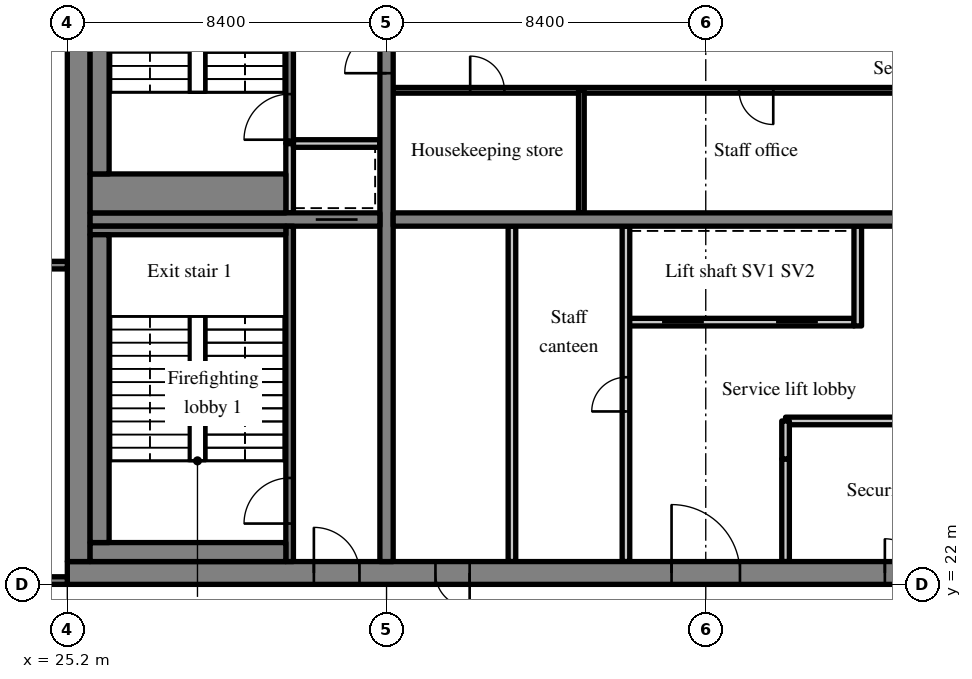
"""IFC4 building model, lengths in metres.
Left out: names, types, materials, properties, quantities, classifications, styles, units other than length and angle.
Written with IfcOpenShell. Run it as: python <this file> out.ifc"""

import sys

from ifc_helpers import new_model, si_unit, direction, frame, frame_2d, origin, place, context, subcontext, project, spatial, rectangle, extrude, source, transform, mapped, element, fill, save


model = new_model("IFC4")
c1 = context("Model", 3, precision=1e-05, world=origin(), true_north=direction((0.0, 1.0)))
c2 = subcontext(c1, "Body", "Model", "MODEL_VIEW")
j1 = project(units=[si_unit("LENGTHUNIT", "METRE"), si_unit("PLANEANGLEUNIT", "RADIAN")], contexts=[c1])
p1 = place(None, origin())
s1 = spatial("IfcSite", under=j1, at=p1, CompositionType="ELEMENT")
p2 = place(p1, origin())
s2 = spatial("IfcBuilding", under=s1, at=p2, CompositionType="ELEMENT")
p3 = place(p2, frame((0.0, 0.0, 221.8)))
s3 = spatial("IfcBuildingStorey", under=s2, at=p3, CompositionType="ELEMENT", Elevation=221.8)
m1 = source(origin(), c2, "Body", "SweptSolid", [
    extrude(rectangle(XDim=50.4, YDim=0.6, at=frame_2d((25.2, 0.0))), origin(), (0.0, 0.0, 1.0), 3.62),
])
p4 = place(p3, frame((25.2, 22.3, 0.0), z_axis=(0.0, 0.0, 1.0), x_axis=(1.0, 0.0, 0.0)))
e1 = element("IfcWall", 1, at=p4, inside=s3, PredefinedType="SHEAR", context=c2, shape_type="MappedRepresentation", body=[
    mapped(m1, transform((0.0, 0.0, 0.0), scale=1.0)),
])
m2 = source(origin(), c2, "Body", "SweptSolid", [
    extrude(rectangle(XDim=1.8, YDim=2.1, at=frame_2d((0.9, 1.05))), frame((0.0, 0.31, 0.0), z_axis=(0.0, -1.0, 0.0), x_axis=(1.0, 0.0, 0.0)), (0.0, 0.0, 1.0), 0.62),
])
p5 = place(p4, frame((15.9, 0.0, 0.0)))
e2 = element("IfcOpeningElement", 2, at=p5, cuts=e1, PredefinedType="OPENING", context=c2, shape_type="MappedRepresentation", body=[
    mapped(m2, transform((0.0, 0.0, 0.0), scale=1.0)),
])
m3 = source(origin(), c2, "Body", "SweptSolid", [
    extrude(rectangle(XDim=0.9, YDim=2.1, at=frame_2d((0.45, 1.05))), frame((0.0, 0.31, 0.0), z_axis=(0.0, -1.0, 0.0), x_axis=(1.0, 0.0, 0.0)), (0.0, 0.0, 1.0), 0.62),
])
p6 = place(p4, frame((9.687, 0.0, 0.0)))
e3 = element("IfcOpeningElement", 3, at=p6, cuts=e1, PredefinedType="OPENING", context=c2, shape_type="MappedRepresentation", body=[
    mapped(m3, transform((0.0, 0.0, 0.0), scale=1.0)),
])
p7 = place(p4, frame((21.513, 0.0, 0.0)))
e4 = element("IfcOpeningElement", 4, at=p7, cuts=e1, PredefinedType="OPENING", context=c2, shape_type="MappedRepresentation", body=[
    mapped(m3, transform((0.0, 0.0, 0.0), scale=1.0)),
])
p8 = place(p4, frame((32.7, 0.0, 0.0)))
e5 = element("IfcOpeningElement", 5, at=p8, cuts=e1, PredefinedType="OPENING", context=c2, shape_type="MappedRepresentation", body=[
    mapped(m2, transform((0.0, 0.0, 0.0), scale=1.0)),
])
m4 = source(origin(), c2, "Body", "SweptSolid", [
    extrude(rectangle(XDim=1.2, YDim=2.1, at=frame_2d((0.6, 1.05))), frame((0.0, 0.31, 0.0), z_axis=(0.0, -1.0, 0.0), x_axis=(1.0, 0.0, 0.0)), (0.0, 0.0, 1.0), 0.62),
])
p9 = place(p4, frame((6.488, 0.0, 0.0)))
e6 = element("IfcOpeningElement", 6, at=p9, cuts=e1, PredefinedType="OPENING", context=c2, shape_type="MappedRepresentation", body=[
    mapped(m4, transform((0.0, 0.0, 0.0), scale=1.0)),
])
p10 = place(p4, frame((47.925, 0.0, 0.0)))
e7 = element("IfcOpeningElement", 7, at=p10, cuts=e1, PredefinedType="OPENING", context=c2, shape_type="MappedRepresentation", body=[
    mapped(m4, transform((0.0, 0.0, 0.0), scale=1.0)),
])
m5 = source(origin(), c2, "Body", "SweptSolid", [
    extrude(rectangle(XDim=18.8, YDim=0.6, at=frame_2d((9.4, 0.0))), origin(), (0.0, 0.0, 1.0), 3.62),
])
p11 = place(p3, frame((25.5, 22.6, 0.0), z_axis=(0.0, 0.0, 1.0), x_axis=(0.0, 1.0, 0.0)))
e8 = element("IfcWall", 8, at=p11, inside=s3, PredefinedType="SHEAR", context=c2, shape_type="MappedRepresentation", body=[
    mapped(m5, transform((0.0, 0.0, 0.0), scale=1.0)),
])
m6 = source(origin(), c2, "Body", "SweptSolid", [
    extrude(rectangle(XDim=18.8, YDim=0.35, at=frame_2d((9.4, 0.0))), origin(), (0.0, 0.0, 1.0), 3.62),
])
p12 = place(p3, frame((33.6, 22.6, 0.0), z_axis=(0.0, 0.0, 1.0), x_axis=(0.0, 1.0, 0.0)))
e9 = element("IfcWall", 9, at=p12, inside=s3, PredefinedType="SHEAR", context=c2, shape_type="MappedRepresentation", body=[
    mapped(m6, transform((0.0, 0.0, 0.0), scale=1.0)),
])
m7 = source(origin(), c2, "Body", "SweptSolid", [
    extrude(rectangle(XDim=1.1, YDim=2.1, at=frame_2d((0.55, 1.05))), frame((0.0, 0.185, 0.0), z_axis=(0.0, -1.0, 0.0), x_axis=(1.0, 0.0, 0.0)), (0.0, 0.0, 1.0), 0.37),
])
p13 = place(p12, frame((12.85, 0.0, 0.0)))
e10 = element("IfcOpeningElement", 10, at=p13, cuts=e9, PredefinedType="OPENING", context=c2, shape_type="MappedRepresentation", body=[
    mapped(m7, transform((0.0, 0.0, 0.0), scale=1.0)),
])
m8 = source(origin(), c2, "Body", "SweptSolid", [
    extrude(rectangle(XDim=7.625, YDim=0.35, at=frame_2d((3.812, 0.0))), origin(), (0.0, 0.0, 1.0), 3.62),
])
p14 = place(p3, frame((25.8, 31.6, 0.0), z_axis=(0.0, 0.0, 1.0), x_axis=(1.0, 0.0, 0.0)))
e11 = element("IfcWall", 11, at=p14, inside=s3, PredefinedType="SHEAR", context=c2, shape_type="MappedRepresentation", body=[
    mapped(m8, transform((0.0, 0.0, 0.0), scale=1.0)),
])
p15 = place(p14, frame((5.938, 0.0, 0.0)))
e12 = element("IfcOpeningElement", 12, at=p15, cuts=e11, PredefinedType="OPENING", context=c2, shape_type="MappedRepresentation", body=[
    mapped(m7, transform((0.0, 0.0, 0.0), scale=1.0)),
])
m9 = source(origin(), c2, "Body", "SweptSolid", [
    extrude(rectangle(XDim=16.45, YDim=0.35, at=frame_2d((8.225, 0.0))), origin(), (0.0, 0.0, 1.0), 3.62),
])
p16 = place(p3, frame((33.775, 31.6, 0.0), z_axis=(0.0, 0.0, 1.0), x_axis=(1.0, 0.0, 0.0)))
e13 = element("IfcWall", 13, at=p16, inside=s3, PredefinedType="SHEAR", context=c2, shape_type="MappedRepresentation", body=[
    mapped(m9, transform((0.0, 0.0, 0.0), scale=1.0)),
])
m10 = source(origin(), c2, "Body", "SweptSolid", [
    extrude(rectangle(XDim=1.0, YDim=2.1, at=frame_2d((0.5, 1.05))), frame((0.0, 0.185, 0.0), z_axis=(0.0, -1.0, 0.0), x_axis=(1.0, 0.0, 0.0)), (0.0, 0.0, 1.0), 0.37),
])
p17 = place(p16, frame((14.837, 0.0, 0.0)))
e14 = element("IfcOpeningElement", 14, at=p17, cuts=e13, PredefinedType="OPENING", context=c2, shape_type="MappedRepresentation", body=[
    mapped(m10, transform((0.0, 0.0, 0.0), scale=1.0)),
])
m11 = source(origin(), c2, "Body", "SweptSolid", [
    extrude(rectangle(XDim=6.0, YDim=0.2, at=frame_2d((3.0, 0.0))), origin(), (0.0, 0.0, 1.0), 3.62),
])
p18 = place(p3, frame((39.9, 28.9, 0.0), z_axis=(0.0, 0.0, 1.0), x_axis=(1.0, 0.0, 0.0)))
e15 = element("IfcWall", 15, at=p18, inside=s3, PredefinedType="SOLIDWALL", context=c2, shape_type="MappedRepresentation", body=[
    mapped(m11, transform((0.0, 0.0, 0.0), scale=1.0)),
])
m12 = source(origin(), c2, "Body", "SweptSolid", [
    extrude(rectangle(XDim=1.1, YDim=2.1, at=frame_2d((0.55, 1.05))), frame((0.0, 0.11, 0.0), z_axis=(0.0, -1.0, 0.0), x_axis=(1.0, 0.0, 0.0)), (0.0, 0.0, 1.0), 0.22),
])
p19 = place(p18, frame((0.95, 0.0, 0.0)))
e16 = element("IfcOpeningElement", 16, at=p19, cuts=e15, PredefinedType="OPENING", context=c2, shape_type="MappedRepresentation", body=[
    mapped(m12, transform((0.0, 0.0, 0.0), scale=1.0)),
])
p20 = place(p18, frame((3.95, 0.0, 0.0)))
e17 = element("IfcOpeningElement", 17, at=p20, cuts=e15, PredefinedType="OPENING", context=c2, shape_type="MappedRepresentation", body=[
    mapped(m12, transform((0.0, 0.0, 0.0), scale=1.0)),
])
m13 = source(origin(), c2, "Body", "SweptSolid", [
    extrude(rectangle(XDim=8.825, YDim=0.2, at=frame_2d((4.413, 0.0))), origin(), (0.0, 0.0, 1.0), 3.62),
])
p21 = place(p3, frame((39.9, 22.6, 0.0), z_axis=(0.0, 0.0, 1.0), x_axis=(0.0, 1.0, 0.0)))
e18 = element("IfcWall", 18, at=p21, inside=s3, PredefinedType="PARTITIONING", context=c2, shape_type="MappedRepresentation", body=[
    mapped(m13, transform((0.0, 0.0, 0.0), scale=1.0)),
])
m14 = source(origin(), c2, "Body", "SweptSolid", [
    extrude(rectangle(XDim=0.9, YDim=2.1, at=frame_2d((0.45, 1.05))), frame((0.0, 0.11, 0.0), z_axis=(0.0, -1.0, 0.0), x_axis=(1.0, 0.0, 0.0)), (0.0, 0.0, 1.0), 0.22),
])
p22 = place(p21, frame((3.95, 0.0, 0.0)))
e19 = element("IfcOpeningElement", 19, at=p22, cuts=e18, PredefinedType="OPENING", context=c2, shape_type="MappedRepresentation", body=[
    mapped(m14, transform((0.0, 0.0, 0.0), scale=1.0)),
])
m15 = source(origin(), c2, "Body", "SweptSolid", [
    extrude(rectangle(XDim=2.7, YDim=0.2, at=frame_2d((1.35, 0.0))), origin(), (0.0, 0.0, 1.0), 3.62),
])
p23 = place(p3, frame((44.1, 22.6, 0.0), z_axis=(0.0, 0.0, 1.0), x_axis=(0.0, 1.0, 0.0)))
e20 = element("IfcWall", 20, at=p23, inside=s3, PredefinedType="PARTITIONING", context=c2, shape_type="MappedRepresentation", body=[
    mapped(m15, transform((0.0, 0.0, 0.0), scale=1.0)),
])
m16 = source(origin(), c2, "Body", "SweptSolid", [
    extrude(rectangle(XDim=2.625, YDim=0.2, at=frame_2d((1.312, 0.0))), origin(), (0.0, 0.0, 1.0), 3.62),
])
p24 = place(p3, frame((46.0, 28.8, 0.0), z_axis=(0.0, 0.0, 1.0), x_axis=(0.0, 1.0, 0.0)))
e21 = element("IfcWall", 21, at=p24, inside=s3, PredefinedType="SOLIDWALL", context=c2, shape_type="MappedRepresentation", body=[
    mapped(m16, transform((0.0, 0.0, 0.0), scale=1.0)),
])
p25 = place(p3, frame((36.9, 22.6, 0.0), z_axis=(0.0, 0.0, 1.0), x_axis=(0.0, 1.0, 0.0)))
e22 = element("IfcWall", 22, at=p25, inside=s3, PredefinedType="PARTITIONING", context=c2, shape_type="MappedRepresentation", body=[
    mapped(m13, transform((0.0, 0.0, 0.0), scale=1.0)),
])
m17 = source(origin(), c2, "Body", "SweptSolid", [
    extrude(rectangle(XDim=6.125, YDim=0.2, at=frame_2d((3.062, 0.0))), origin(), (0.0, 0.0, 1.0), 3.62),
])
p26 = place(p3, frame((44.1, 26.3, 0.0), z_axis=(0.0, 0.0, 1.0), x_axis=(1.0, 0.0, 0.0)))
e23 = element("IfcWall", 23, at=p26, inside=s3, PredefinedType="PARTITIONING", context=c2, shape_type="MappedRepresentation", body=[
    mapped(m17, transform((0.0, 0.0, 0.0), scale=1.0)),
])
m18 = source(origin(), c2, "Body", "SweptSolid", [
    extrude(rectangle(XDim=1.0, YDim=0.2, at=frame_2d((0.5, 0.0))), origin(), (0.0, 0.0, 1.0), 3.62),
])
p27 = place(p3, frame((44.1, 25.3, 0.0), z_axis=(0.0, 0.0, 1.0), x_axis=(0.0, 1.0, 0.0)))
e24 = element("IfcWall", 24, at=p27, inside=s3, PredefinedType="PARTITIONING", context=c2, shape_type="MappedRepresentation", body=[
    mapped(m18, transform((0.0, 0.0, 0.0), scale=1.0)),
])
m19 = source(origin(), c2, "Body", "SweptSolid", [
    extrude(rectangle(XDim=14.225, YDim=0.15, at=frame_2d((7.113, 0.0))), origin(), (0.0, 0.0, 1.0), 3.62),
])
p28 = place(p3, frame((33.775, 35.0, 0.0), z_axis=(0.0, 0.0, 1.0), x_axis=(1.0, 0.0, 0.0)))
e25 = element("IfcWall", 25, at=p28, inside=s3, PredefinedType="PARTITIONING", context=c2, shape_type="MappedRepresentation", body=[
    mapped(m19, transform((0.0, 0.0, 0.0), scale=1.0)),
])
m20 = source(origin(), c2, "Body", "SweptSolid", [
    extrude(rectangle(XDim=0.9, YDim=2.1, at=frame_2d((0.45, 1.05))), frame((0.0, 0.085, 0.0), z_axis=(0.0, -1.0, 0.0), x_axis=(1.0, 0.0, 0.0)), (0.0, 0.0, 1.0), 0.17),
])
p29 = place(p28, frame((2.026, 0.0, 0.0)))
e26 = element("IfcOpeningElement", 26, at=p29, cuts=e25, PredefinedType="OPENING", context=c2, shape_type="MappedRepresentation", body=[
    mapped(m20, transform((0.0, 0.0, 0.0), scale=1.0)),
])
p30 = place(p28, frame((9.101, 0.0, 0.0)))
e27 = element("IfcOpeningElement", 27, at=p30, cuts=e25, PredefinedType="OPENING", context=c2, shape_type="MappedRepresentation", body=[
    mapped(m20, transform((0.0, 0.0, 0.0), scale=1.0)),
])
m21 = source(origin(), c2, "Body", "SweptSolid", [
    extrude(rectangle(XDim=3.225, YDim=0.15, at=frame_2d((1.613, 0.0))), origin(), (0.0, 0.0, 1.0), 3.62),
])
p31 = place(p3, frame((38.727, 31.775, 0.0), z_axis=(0.0, 0.0, 1.0), x_axis=(0.0, 1.0, 0.0)))
e28 = element("IfcWall", 28, at=p31, inside=s3, PredefinedType="PARTITIONING", context=c2, shape_type="MappedRepresentation", body=[
    mapped(m21, transform((0.0, 0.0, 0.0), scale=1.0)),
])
m22 = source(origin(), c2, "Body", "SweptSolid", [
    extrude(rectangle(XDim=8.825, YDim=0.2, at=frame_2d((4.413, 0.0))), origin(), (0.0, 0.0, 1.0), 3.62),
])
p32 = place(p3, frame((31.05, 22.6, 0.0), z_axis=(0.0, 0.0, 1.0), x_axis=(0.0, 1.0, 0.0)))
e29 = element("IfcWall", 29, at=p32, inside=s3, PredefinedType="SOLIDWALL", context=c2, shape_type="MappedRepresentation", body=[
    mapped(m22, transform((0.0, 0.0, 0.0), scale=1.0)),
])
m23 = source(origin(), c2, "Body", "SweptSolid", [
    extrude(rectangle(XDim=1.2, YDim=2.1, at=frame_2d((0.6, 1.05))), frame((0.0, 0.11, 0.0), z_axis=(0.0, -1.0, 0.0), x_axis=(1.0, 0.0, 0.0)), (0.0, 0.0, 1.0), 0.22),
])
p33 = place(p32, frame((1.0, 0.0, 0.0)))
e30 = element("IfcOpeningElement", 30, at=p33, cuts=e29, PredefinedType="OPENING", context=c2, shape_type="MappedRepresentation", body=[
    mapped(m23, transform((0.0, 0.0, 0.0), scale=1.0)),
])
m24 = source(origin(), c2, "Body", "SweptSolid", [
    extrude(rectangle(XDim=1.825, YDim=0.2, at=frame_2d((0.913, 0.0))), origin(), (0.0, 0.0, 1.0), 3.62),
])
p34 = place(p3, frame((31.05, 31.775, 0.0), z_axis=(0.0, 0.0, 1.0), x_axis=(0.0, 1.0, 0.0)))
e31 = element("IfcWall", 31, at=p34, inside=s3, PredefinedType="SOLIDWALL", context=c2, shape_type="MappedRepresentation", body=[
    mapped(m24, transform((0.0, 0.0, 0.0), scale=1.0)),
])
m25 = source(origin(), c2, "Body", "SweptSolid", [
    extrude(rectangle(XDim=2.275, YDim=0.2, at=frame_2d((1.138, 0.0))), origin(), (0.0, 0.0, 1.0), 3.62),
])
p35 = place(p3, frame((31.15, 33.6, 0.0), z_axis=(0.0, 0.0, 1.0), x_axis=(1.0, 0.0, 0.0)))
e32 = element("IfcWall", 32, at=p35, inside=s3, PredefinedType="SOLIDWALL", context=c2, shape_type="MappedRepresentation", body=[
    mapped(m25, transform((0.0, 0.0, 0.0), scale=1.0)),
])
m26 = source(origin(), c2, "Body", "SweptSolid", [
    extrude(rectangle(XDim=7.8, YDim=0.2, at=frame_2d((3.9, 0.0))), origin(), (0.0, 0.0, 1.0), 3.62),
])
p36 = place(p3, frame((31.05, 33.6, 0.0), z_axis=(0.0, 0.0, 1.0), x_axis=(0.0, 1.0, 0.0)))
e33 = element("IfcWall", 33, at=p36, inside=s3, PredefinedType="SOLIDWALL", context=c2, shape_type="MappedRepresentation", body=[
    mapped(m26, transform((0.0, 0.0, 0.0), scale=1.0)),
])
p37 = place(p36, frame((0.1, 0.0, 0.0)))
e34 = element("IfcOpeningElement", 34, at=p37, cuts=e33, PredefinedType="OPENING", context=c2, shape_type="MappedRepresentation", body=[
    mapped(m23, transform((0.0, 0.0, 0.0), scale=1.0)),
])
m27 = source(origin(), c2, "Body", "SweptSolid", [
    extrude(rectangle(XDim=8.1, YDim=0.2, at=frame_2d((4.05, 0.0))), origin(), (0.0, 0.0, 1.0), 3.62),
])
p38 = place(p3, frame((17.1, 22.1, 0.0), z_axis=(0.0, 0.0, 1.0), x_axis=(1.0, 0.0, 0.0)))
e35 = element("IfcWall", 35, at=p38, inside=s3, PredefinedType="SOLIDWALL", context=c2, shape_type="MappedRepresentation", body=[
    mapped(m27, transform((0.0, 0.0, 0.0), scale=1.0)),
])
p39 = place(p38, frame((5.9, 0.0, 0.0)))
e36 = element("IfcOpeningElement", 36, at=p39, cuts=e35, PredefinedType="OPENING", context=c2, shape_type="MappedRepresentation", body=[
    mapped(m23, transform((0.0, 0.0, 0.0), scale=1.0)),
])
p40 = place(p3, frame((17.1, 30.4, 0.0), z_axis=(0.0, 0.0, 1.0), x_axis=(1.0, 0.0, 0.0)))
e37 = element("IfcWall", 37, at=p40, inside=s3, PredefinedType="SOLIDWALL", context=c2, shape_type="MappedRepresentation", body=[
    mapped(m27, transform((0.0, 0.0, 0.0), scale=1.0)),
])
m28 = source(origin(), c2, "Body", "SweptSolid", [
    extrude(rectangle(XDim=1.0, YDim=2.1, at=frame_2d((0.5, 1.05))), frame((0.0, 0.11, 0.0), z_axis=(0.0, -1.0, 0.0), x_axis=(1.0, 0.0, 0.0)), (0.0, 0.0, 1.0), 0.22),
])
p41 = place(p40, frame((6.0, 0.0, 0.0)))
e38 = element("IfcOpeningElement", 38, at=p41, cuts=e37, PredefinedType="OPENING", context=c2, shape_type="MappedRepresentation", body=[
    mapped(m28, transform((0.0, 0.0, 0.0), scale=1.0)),
])
m29 = source(origin(), c2, "Body", "SweptSolid", [
    extrude(rectangle(XDim=5.15, YDim=0.5, at=frame_2d((2.575, 0.0))), origin(), (0.0, 0.0, 1.0), 3.62),
])
p42 = place(p3, frame((25.8, 22.85, 0.0), z_axis=(0.0, 0.0, 1.0), x_axis=(1.0, 0.0, 0.0)))
e39 = element("IfcWall", 39, at=p42, inside=s3, PredefinedType="SOLIDWALL", context=c2, shape_type="MappedRepresentation", body=[
    mapped(m29, transform((0.0, 0.0, 0.0), scale=1.0)),
])
m30 = source(origin(), c2, "Body", "SweptSolid", [
    extrude(rectangle(XDim=5.15, YDim=0.225, at=frame_2d((2.575, 0.0))), origin(), (0.0, 0.0, 1.0), 3.62),
])
p43 = place(p3, frame((25.8, 31.312, 0.0), z_axis=(0.0, 0.0, 1.0), x_axis=(1.0, 0.0, 0.0)))
e40 = element("IfcWall", 40, at=p43, inside=s3, PredefinedType="SOLIDWALL", context=c2, shape_type="MappedRepresentation", body=[
    mapped(m30, transform((0.0, 0.0, 0.0), scale=1.0)),
])
m31 = source(origin(), c2, "Body", "SweptSolid", [
    extrude(rectangle(XDim=8.1, YDim=0.5, at=frame_2d((4.05, 0.0))), origin(), (0.0, 0.0, 1.0), 3.62),
])
p44 = place(p3, frame((26.05, 23.1, 0.0), z_axis=(0.0, 0.0, 1.0), x_axis=(0.0, 1.0, 0.0)))
e41 = element("IfcWall", 41, at=p44, inside=s3, PredefinedType="SOLIDWALL", context=c2, shape_type="MappedRepresentation", body=[
    mapped(m31, transform((0.0, 0.0, 0.0), scale=1.0)),
])
m32 = source(origin(), c2, "Body", "SweptSolid", [
    extrude(rectangle(XDim=5.15, YDim=1.025, at=frame_2d((2.575, 0.0))), origin(), (0.0, 0.0, 1.0), 3.62),
])
p45 = place(p3, frame((25.8, 32.287, 0.0), z_axis=(0.0, 0.0, 1.0), x_axis=(1.0, 0.0, 0.0)))
e42 = element("IfcWall", 42, at=p45, inside=s3, PredefinedType="SOLIDWALL", context=c2, shape_type="MappedRepresentation", body=[
    mapped(m32, transform((0.0, 0.0, 0.0), scale=1.0)),
])
p46 = place(p3, frame((26.05, 32.8, 0.0), z_axis=(0.0, 0.0, 1.0), x_axis=(0.0, 1.0, 0.0)))
e43 = element("IfcWall", 43, at=p46, inside=s3, PredefinedType="SOLIDWALL", context=c2, shape_type="MappedRepresentation", body=[
    mapped(m31, transform((0.0, 0.0, 0.0), scale=1.0)),
])
m33 = source(origin(), c2, "Body", "SweptSolid", [
    extrude(rectangle(XDim=1.8, YDim=2.1, at=frame_2d((0.9, 1.05))), frame((0.0, 0.225, 0.0), z_axis=(0.0, -1.0, 0.0), x_axis=(1.0, 0.0, 0.0)), (0.0, 0.0, 1.0), 0.05),
])
p47 = place(p5, origin())
e44 = element("IfcDoor", 44, at=p47, inside=s3, OperationType="DOUBLE_DOOR_SINGLE_SWING", PredefinedType="DOOR", context=c2, shape_type="MappedRepresentation", body=[
    mapped(m33, transform((0.0, 0.0, 0.0), scale=1.0)),
])
fill(e2, e44)
m34 = source(origin(), c2, "Body", "SweptSolid", [
    extrude(rectangle(XDim=1.1, YDim=2.1, at=frame_2d((0.55, 1.05))), frame((0.0, 0.025, 0.0), z_axis=(0.0, -1.0, 0.0), x_axis=(1.0, 0.0, 0.0)), (0.0, 0.0, 1.0), 0.05),
])
p48 = place(p19, origin())
e45 = element("IfcDoor", 45, at=p48, inside=s3, OperationType="SLIDING_TO_LEFT", PredefinedType="DOOR", context=c2, shape_type="MappedRepresentation", body=[
    mapped(m34, transform((0.0, 0.0, 0.0), scale=1.0)),
])
fill(e16, e45)
p49 = place(p20, origin())
e46 = element("IfcDoor", 46, at=p49, inside=s3, OperationType="SLIDING_TO_RIGHT", PredefinedType="DOOR", context=c2, shape_type="MappedRepresentation", body=[
    mapped(m34, transform((0.0, 0.0, 0.0), scale=1.0)),
])
fill(e17, e46)
m35 = source(origin(), c2, "Body", "SweptSolid", [
    extrude(rectangle(XDim=0.9, YDim=2.1, at=frame_2d((0.45, 1.05))), frame((0.0, 0.225, 0.0), z_axis=(0.0, -1.0, 0.0), x_axis=(1.0, 0.0, 0.0)), (0.0, 0.0, 1.0), 0.05),
])
p50 = place(p6, origin())
e47 = element("IfcDoor", 47, at=p50, inside=s3, OperationType="SINGLE_SWING_RIGHT", PredefinedType="DOOR", context=c2, shape_type="MappedRepresentation", body=[
    mapped(m35, transform((0.0, 0.0, 0.0), scale=1.0)),
])
fill(e3, e47)
m36 = source(origin(), c2, "Body", "SweptSolid", [
    extrude(rectangle(XDim=0.9, YDim=2.1, at=frame_2d((0.45, 1.05))), frame((0.0, 0.025, 0.0), z_axis=(0.0, -1.0, 0.0), x_axis=(1.0, 0.0, 0.0)), (0.0, 0.0, 1.0), 0.05),
])
p51 = place(p22, origin())
e48 = element("IfcDoor", 48, at=p51, inside=s3, OperationType="SINGLE_SWING_LEFT", PredefinedType="DOOR", context=c2, shape_type="MappedRepresentation", body=[
    mapped(m36, transform((0.0, 0.0, 0.0), scale=1.0)),
])
fill(e19, e48)
p52 = place(p7, origin())
e49 = element("IfcDoor", 49, at=p52, inside=s3, OperationType="SINGLE_SWING_LEFT", PredefinedType="DOOR", context=c2, shape_type="MappedRepresentation", body=[
    mapped(m35, transform((0.0, 0.0, 0.0), scale=1.0)),
])
fill(e4, e49)
p53 = place(p29, origin())
e50 = element("IfcDoor", 50, at=p53, inside=s3, OperationType="SINGLE_SWING_LEFT", PredefinedType="DOOR", context=c2, shape_type="MappedRepresentation", body=[
    mapped(m36, transform((0.0, 0.0, 0.0), scale=1.0)),
])
fill(e26, e50)
p54 = place(p30, origin())
e51 = element("IfcDoor", 51, at=p54, inside=s3, OperationType="SINGLE_SWING_RIGHT", PredefinedType="DOOR", context=c2, shape_type="MappedRepresentation", body=[
    mapped(m36, transform((0.0, 0.0, 0.0), scale=1.0)),
])
fill(e27, e51)
m37 = source(origin(), c2, "Body", "SweptSolid", [
    extrude(rectangle(XDim=1.2, YDim=2.1, at=frame_2d((0.6, 1.05))), frame((0.0, 0.025, 0.0), z_axis=(0.0, -1.0, 0.0), x_axis=(1.0, 0.0, 0.0)), (0.0, 0.0, 1.0), 0.05),
])
p55 = place(p33, origin())
e52 = element("IfcDoor", 52, at=p55, inside=s3, OperationType="SINGLE_SWING_LEFT", PredefinedType="DOOR", context=c2, shape_type="MappedRepresentation", body=[
    mapped(m37, transform((0.0, 0.0, 0.0), scale=1.0)),
])
fill(e30, e52)
m38 = source(origin(), c2, "Body", "SweptSolid", [
    extrude(rectangle(XDim=1.2, YDim=2.1, at=frame_2d((0.6, 1.05))), frame((0.0, 0.225, 0.0), z_axis=(0.0, -1.0, 0.0), x_axis=(1.0, 0.0, 0.0)), (0.0, 0.0, 1.0), 0.05),
])
p56 = place(p9, origin())
e53 = element("IfcDoor", 53, at=p56, inside=s3, OperationType="SINGLE_SWING_LEFT", PredefinedType="DOOR", context=c2, shape_type="MappedRepresentation", body=[
    mapped(m38, transform((0.0, 0.0, 0.0), scale=1.0)),
])
fill(e6, e53)
p57 = place(p15, origin())
e54 = element("IfcDoor", 54, at=p57, inside=s3, OperationType="SLIDING_TO_LEFT", PredefinedType="DOOR", context=c2, shape_type="MappedRepresentation", body=[
    mapped(m34, transform((0.0, 0.0, 0.0), scale=1.0)),
])
fill(e12, e54)
p58 = place(p37, origin())
e55 = element("IfcDoor", 55, at=p58, inside=s3, OperationType="SINGLE_SWING_LEFT", PredefinedType="DOOR", context=c2, shape_type="MappedRepresentation", body=[
    mapped(m37, transform((0.0, 0.0, 0.0), scale=1.0)),
])
fill(e34, e55)
p59 = place(p13, origin())
e56 = element("IfcDoor", 56, at=p59, inside=s3, OperationType="SINGLE_SWING_LEFT", PredefinedType="DOOR", context=c2, shape_type="MappedRepresentation", body=[
    mapped(m34, transform((0.0, 0.0, 0.0), scale=1.0)),
])
fill(e10, e56)
save(model, sys.argv[1])
